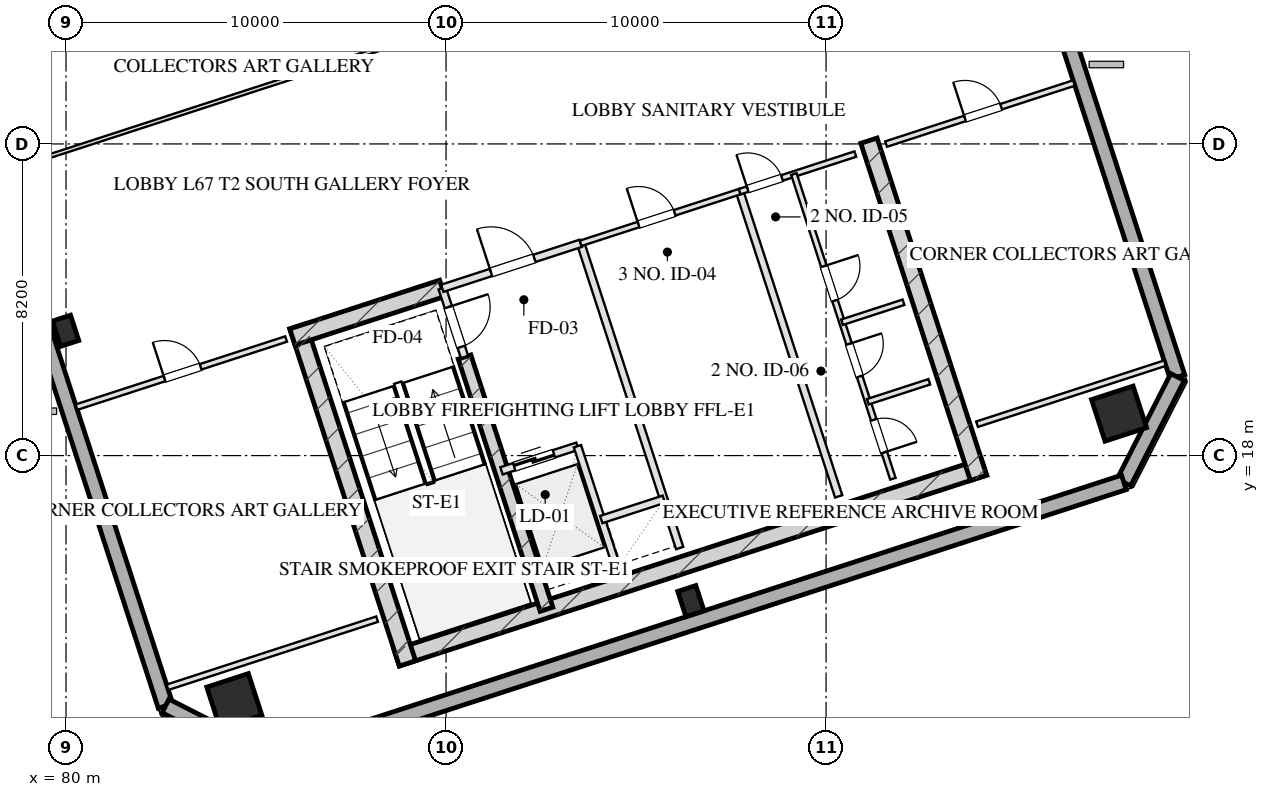
"""IFC4 building model, lengths in metres.
Left out: names, types, materials, properties, quantities, classifications, styles, units other than length and angle.
Written with IfcOpenShell. Run it as: python <this file> out.ifc"""

import sys

from ifc_helpers import new_model, si_unit, direction, frame, frame_2d, origin, origin_2d, place, context, subcontext, project, spatial, rectangle, hollow_rectangle, extrude, element, fill, save


model = new_model("IFC4")
c1 = context("Model", 3, precision=1e-05, world=origin(), true_north=direction((0.0, 1.0)))
c2 = subcontext(c1, "Body", "Model", "MODEL_VIEW")
j1 = project(units=[si_unit("LENGTHUNIT", "METRE"), si_unit("PLANEANGLEUNIT", "RADIAN")], contexts=[c1])
p1 = place(None, origin())
s1 = spatial("IfcSite", under=j1, at=p1, CompositionType="ELEMENT")
p2 = place(p1, origin())
s2 = spatial("IfcBuilding", under=s1, at=p2, CompositionType="ELEMENT")
p3 = place(p2, frame((0.0, 0.0, 247.2)))
s3 = spatial("IfcBuildingStorey", under=s2, at=p3, CompositionType="ELEMENT", Elevation=247.2)
p4 = place(p3, frame((88.701, 12.675, 0.0), z_axis=(0.0, 0.0, 1.0), x_axis=(0.95105824505, 0.309011673763, 0.0)))
e1 = element("IfcWall", 1, at=p4, inside=s3, PredefinedType="SHEAR", context=c2, shape_type="SweptSolid", body=[
    extrude(rectangle(XDim=16.25, YDim=0.45, at=frame_2d((8.125, 0.0))), origin(), (0.0, 0.0, 1.0), 3.2),
])
for number, where, z_axis, x_axis in (
    (2, (86.102, 21.404, 0.0), (0.0, 0.0, 1.0), (0.309, -0.951, 0.0)),
    (3, (101.128, 26.286, 0.0), (0.0, 0.0, 1.0), (0.309, -0.951, 0.0)),
):
    element("IfcWall", number, at=place(p3, frame(where, z_axis=z_axis, x_axis=x_axis)), inside=s3, PredefinedType="SHEAR", context=c2, shape_type="SweptSolid", body=[
        extrude(rectangle(XDim=9.33, YDim=0.45, at=frame_2d((4.665, 0.0))), origin(), (0.0, 0.0, 1.0), 3.2),
    ])
p5 = place(p3, frame((90.486, 20.594, 0.0), z_axis=(0.0, 0.0, 1.0), x_axis=(0.309020428229, -0.951055400562, 0.0)))
e4 = element("IfcWall", 4, at=p5, inside=s3, PredefinedType="SHEAR", context=c2, shape_type="SweptSolid", body=[
    extrude(rectangle(XDim=6.98, YDim=0.35, at=frame_2d((3.49, 0.0))), origin(), (0.0, 0.0, 1.0), 3.2),
])
p6 = place(p3, frame((85.957, 21.12, 0.0), z_axis=(0.0, 0.0, 1.0), x_axis=(0.951064796122, 0.308991510526, 0.0)))
e5 = element("IfcWall", 5, at=p6, inside=s3, PredefinedType="SHEAR", context=c2, shape_type="SweptSolid", body=[
    extrude(rectangle(XDim=4.145, YDim=0.45, at=frame_2d((2.073, 0.0))), origin(), (0.0, 0.0, 1.0), 3.2),
])
for number, where, z_axis, x_axis in (
    (6, (84.428, 11.539, 0.0), (0.0, 0.0, 1.0), (0.951, 0.309, 0.0)),
    (7, (107.71, 19.104, 0.0), (0.0, 0.0, 1.0), (0.951, 0.309, 0.0)),
):
    element("IfcColumn", number, at=place(p3, frame(where, z_axis=z_axis, x_axis=x_axis)), inside=s3, PredefinedType="COLUMN", context=c2, shape_type="SweptSolid", body=[
        extrude(hollow_rectangle(XDim=1.15, YDim=1.15, WallThickness=0.04, at=origin_2d()), origin(), (0.0, 0.0, 1.0), 3.201),
    ])
for number, where, z_axis, x_axis in (
    (8, (79.99, 21.284, 0.0), (0.0, 0.0, 1.0), (0.951, 0.309, 0.0)),
    (9, (96.443, 14.17, 0.0), (0.0, 0.0, 1.0), (0.951, 0.309, 0.0)),
):
    element("IfcColumn", number, at=place(p3, frame(where, z_axis=z_axis, x_axis=x_axis)), inside=s3, PredefinedType="COLUMN", context=c2, shape_type="SweptSolid", body=[
        extrude(hollow_rectangle(XDim=0.5, YDim=0.7, WallThickness=0.025, at=origin_2d()), origin(), (0.0, 0.0, 1.0), 3.201),
    ])
p7 = place(p3, frame((82.618, 11.414, 0.0), z_axis=(0.0, 0.0, 1.0), x_axis=(-0.309016491071, 0.951056679828, 0.0)))
e10 = element("IfcWall", 10, at=p7, inside=s3, PredefinedType="SOLIDWALL", context=c2, shape_type="SweptSolid", body=[
    extrude(rectangle(XDim=38.4, YDim=0.4, at=frame_2d((19.2, 0.0))), origin(), (0.0, 0.0, 1.0), 2.36),
])
p8 = place(p7, frame((11.825, 0.0, 0.75)))
e11 = element("IfcOpeningElement", 11, at=p8, cuts=e10, PredefinedType="OPENING", context=c2, shape_type="SweptSolid", body=[
    extrude(rectangle(XDim=1.95, YDim=1.21, at=frame_2d((0.975, 0.605))), frame((0.0, 0.21, 0.0), z_axis=(0.0, -1.0, 0.0), x_axis=(1.0, 0.0, 0.0)), (0.0, 0.0, 1.0), 0.42),
])
p9 = place(p7, frame((15.625, 0.0, 0.75)))
e12 = element("IfcOpeningElement", 12, at=p9, cuts=e10, PredefinedType="OPENING", context=c2, shape_type="SweptSolid", body=[
    extrude(rectangle(XDim=1.95, YDim=1.21, at=frame_2d((0.975, 0.605))), frame((0.0, 0.21, 0.0), z_axis=(0.0, -1.0, 0.0), x_axis=(1.0, 0.0, 0.0)), (0.0, 0.0, 1.0), 0.42),
])
p10 = place(p7, frame((21.5, 0.0, 0.0)))
e13 = element("IfcOpeningElement", 13, at=p10, cuts=e10, PredefinedType="OPENING", context=c2, shape_type="SweptSolid", body=[
    extrude(rectangle(XDim=1.1, YDim=2.15, at=frame_2d((0.55, 1.075))), frame((0.0, 0.21, 0.0), z_axis=(0.0, -1.0, 0.0), x_axis=(1.0, 0.0, 0.0)), (0.0, 0.0, 1.0), 0.42),
])
p11 = place(p3, frame((97.382, 56.586, 0.0), z_axis=(0.0, 0.0, 1.0), x_axis=(0.309016491071, -0.951056679828, 0.0)))
e14 = element("IfcWall", 14, at=p11, inside=s3, PredefinedType="SOLIDWALL", context=c2, shape_type="SweptSolid", body=[
    extrude(rectangle(XDim=38.4, YDim=0.4, at=frame_2d((19.2, 0.0))), origin(), (0.0, 0.0, 1.0), 2.36),
])
p12 = place(p11, frame((24.625, 0.0, 0.75)))
e15 = element("IfcOpeningElement", 15, at=p12, cuts=e14, PredefinedType="OPENING", context=c2, shape_type="SweptSolid", body=[
    extrude(rectangle(XDim=1.95, YDim=1.21, at=frame_2d((0.975, 0.605))), frame((0.0, 0.21, 0.0), z_axis=(0.0, -1.0, 0.0), x_axis=(1.0, 0.0, 0.0)), (0.0, 0.0, 1.0), 0.42),
])
p13 = place(p11, frame((20.825, 0.0, 0.75)))
e16 = element("IfcOpeningElement", 16, at=p13, cuts=e14, PredefinedType="OPENING", context=c2, shape_type="SweptSolid", body=[
    extrude(rectangle(XDim=1.95, YDim=1.21, at=frame_2d((0.975, 0.605))), frame((0.0, 0.21, 0.0), z_axis=(0.0, -1.0, 0.0), x_axis=(1.0, 0.0, 0.0)), (0.0, 0.0, 1.0), 0.42),
])
p14 = place(p11, frame((15.8, 0.0, 0.0)))
e17 = element("IfcOpeningElement", 17, at=p14, cuts=e14, PredefinedType="OPENING", context=c2, shape_type="SweptSolid", body=[
    extrude(rectangle(XDim=1.1, YDim=2.15, at=frame_2d((0.55, 1.075))), frame((0.0, 0.21, 0.0), z_axis=(0.0, -1.0, 0.0), x_axis=(1.0, 0.0, 0.0)), (0.0, 0.0, 1.0), 0.42),
])
p15 = place(p3, frame((109.248, 20.066, 0.0), z_axis=(0.0, 0.0, 1.0), x_axis=(-0.453949291228, -0.891027519774, 0.0)))
e18 = element("IfcWall", 18, at=p15, inside=s3, PredefinedType="SOLIDWALL", context=c2, shape_type="SweptSolid", body=[
    extrude(rectangle(XDim=3.111, YDim=0.4, at=frame_2d((1.556, 0.0))), origin(), (0.0, 0.0, 1.0), 2.36),
])
p16 = place(p3, frame((107.835, 17.294, 0.0), z_axis=(0.0, 0.0, 1.0), x_axis=(-0.951058012937, -0.309012388148, 0.0)))
e19 = element("IfcWall", 19, at=p16, inside=s3, PredefinedType="SOLIDWALL", context=c2, shape_type="SweptSolid", body=[
    extrude(rectangle(XDim=23.6, YDim=0.4, at=frame_2d((11.8, 0.0))), origin(), (0.0, 0.0, 1.0), 2.36),
])
p17 = place(p3, frame((85.39, 10.001, 0.0), z_axis=(0.0, 0.0, 1.0), x_axis=(-0.890979603174, 0.454043331334, 0.0)))
e20 = element("IfcWall", 20, at=p17, inside=s3, PredefinedType="SOLIDWALL", context=c2, shape_type="SweptSolid", body=[
    extrude(rectangle(XDim=3.111, YDim=0.4, at=frame_2d((1.556, 0.0))), origin(), (0.0, 0.0, 1.0), 2.36),
])
p18 = place(p3, frame((89.899, 22.401, 0.0), z_axis=(0.0, 0.0, 1.0), x_axis=(0.308932062672, -0.951084108086, 0.0)))
e21 = element("IfcWall", 21, at=p18, inside=s3, PredefinedType="PARTITIONING", context=c2, shape_type="SweptSolid", body=[
    extrude(rectangle(XDim=1.9, YDim=0.2, at=frame_2d((0.95, 0.0))), origin(), (0.0, 0.0, 1.0), 2.925),
])
p19 = place(p18, frame((0.52, 0.0, 0.0)))
e22 = element("IfcOpeningElement", 22, at=p19, cuts=e21, PredefinedType="OPENING", context=c2, shape_type="SweptSolid", body=[
    extrude(rectangle(XDim=1.1, YDim=2.05, at=frame_2d((0.55, 1.025))), frame((0.0, 0.11, 0.0), z_axis=(0.0, -1.0, 0.0), x_axis=(1.0, 0.0, 0.0)), (0.0, 0.0, 1.0), 0.22),
])
p20 = place(p3, frame((93.542, 23.585, 0.0), z_axis=(0.0, 0.0, 1.0), x_axis=(0.309042196757, -0.951048327176, 0.0)))
e23 = element("IfcWall", 23, at=p20, inside=s3, PredefinedType="PARTITIONING", context=c2, shape_type="SweptSolid", body=[
    extrude(rectangle(XDim=8.43, YDim=0.2, at=frame_2d((4.215, 0.0))), origin(), (0.0, 0.0, 1.0), 2.925),
])
p21 = place(p3, frame((89.899, 22.401, 0.0), z_axis=(0.0, 0.0, 1.0), x_axis=(0.951046716504, 0.309047153403, 0.0)))
e24 = element("IfcWall", 24, at=p21, inside=s3, PredefinedType="PARTITIONING", context=c2, shape_type="SweptSolid", body=[
    extrude(rectangle(XDim=3.83, YDim=0.2, at=frame_2d((1.915, 0.0))), origin(), (0.0, 0.0, 1.0), 2.925),
])
p22 = place(p21, frame((1.35, 0.0, 0.0)))
e25 = element("IfcOpeningElement", 25, at=p22, cuts=e24, PredefinedType="OPENING", context=c2, shape_type="SweptSolid", body=[
    extrude(rectangle(XDim=1.2, YDim=2.05, at=frame_2d((0.6, 1.025))), frame((0.0, 0.11, 0.0), z_axis=(0.0, -1.0, 0.0), x_axis=(1.0, 0.0, 0.0)), (0.0, 0.0, 1.0), 0.22),
])
p23 = place(p3, frame((91.46, 17.598, 0.0), z_axis=(0.0, 0.0, 1.0), x_axis=(0.951062257173, 0.308999325213, 0.0)))
e26 = element("IfcWall", 26, at=p23, inside=s3, PredefinedType="PARTITIONING", context=c2, shape_type="SweptSolid", body=[
    extrude(rectangle(XDim=2.1, YDim=0.2, at=frame_2d((1.05, 0.0))), origin(), (0.0, 0.0, 1.0), 2.925),
])
p24 = place(p23, frame((0.35, 0.0, 0.0)))
e27 = element("IfcOpeningElement", 27, at=p24, cuts=e26, PredefinedType="OPENING", context=c2, shape_type="SweptSolid", body=[
    extrude(rectangle(XDim=1.1, YDim=2.05, at=frame_2d((0.55, 1.025))), frame((0.0, 0.11, 0.0), z_axis=(0.0, -1.0, 0.0), x_axis=(1.0, 0.0, 0.0)), (0.0, 0.0, 1.0), 0.22),
])
p25 = place(p3, frame((93.457, 18.247, 0.0), z_axis=(0.0, 0.0, 1.0), x_axis=(0.3089935693, -0.951064127245, 0.0)))
e28 = element("IfcWall", 28, at=p25, inside=s3, PredefinedType="PARTITIONING", context=c2, shape_type="SweptSolid", body=[
    extrude(rectangle(XDim=3.7, YDim=0.2, at=frame_2d((1.85, 0.0))), origin(), (0.0, 0.0, 1.0), 2.925),
])
p26 = place(p3, frame((94.084, 16.317, 0.0), z_axis=(0.0, 0.0, 1.0), x_axis=(0.951041328149, 0.309063734775, 0.0)))
e29 = element("IfcWall", 29, at=p26, inside=s3, PredefinedType="PARTITIONING", context=c2, shape_type="SweptSolid", body=[
    extrude(rectangle(XDim=1.73, YDim=0.2, at=frame_2d((0.865, 0.0))), origin(), (0.0, 0.0, 1.0), 2.925),
])
p27 = place(p3, frame((97.727, 24.944, 0.0), z_axis=(0.0, 0.0, 1.0), x_axis=(0.309016001439, -0.951056838919, 0.0)))
e30 = element("IfcWall", 30, at=p27, inside=s3, PredefinedType="PARTITIONING", context=c2, shape_type="SweptSolid", body=[
    extrude(rectangle(XDim=8.43, YDim=0.2, at=frame_2d((4.215, 0.0))), origin(), (0.0, 0.0, 1.0), 2.925),
])
p28 = place(p3, frame((93.542, 23.585, 0.0), z_axis=(0.0, 0.0, 1.0), x_axis=(0.951063829732, 0.308994485023, 0.0)))
e31 = element("IfcWall", 31, at=p28, inside=s3, PredefinedType="PARTITIONING", context=c2, shape_type="SweptSolid", body=[
    extrude(rectangle(XDim=4.4, YDim=0.15, at=frame_2d((2.2, 0.0))), origin(), (0.0, 0.0, 1.0), 2.925),
])
p29 = place(p28, frame((1.6, 0.0, 0.0)))
e32 = element("IfcOpeningElement", 32, at=p29, cuts=e31, PredefinedType="OPENING", context=c2, shape_type="SweptSolid", body=[
    extrude(rectangle(XDim=1.0, YDim=2.05, at=frame_2d((0.5, 1.025))), frame((0.0, 0.085, 0.0), z_axis=(0.0, -1.0, 0.0), x_axis=(1.0, 0.0, 0.0)), (0.0, 0.0, 1.0), 0.17),
])
p30 = place(p3, frame((97.727, 24.944, 0.0), z_axis=(0.0, 0.0, 1.0), x_axis=(0.951036872128, 0.309077446369, 0.0)))
e33 = element("IfcWall", 33, at=p30, inside=s3, PredefinedType="PARTITIONING", context=c2, shape_type="SweptSolid", body=[
    extrude(rectangle(XDim=3.2, YDim=0.15, at=frame_2d((1.6, 0.0))), origin(), (0.0, 0.0, 1.0), 2.925),
])
p31 = place(p30, frame((0.22, 0.0, 0.0)))
e34 = element("IfcOpeningElement", 34, at=p31, cuts=e33, PredefinedType="OPENING", context=c2, shape_type="SweptSolid", body=[
    extrude(rectangle(XDim=0.95, YDim=2.05, at=frame_2d((0.475, 1.025))), frame((0.0, 0.085, 0.0), z_axis=(0.0, -1.0, 0.0), x_axis=(1.0, 0.0, 0.0)), (0.0, 0.0, 1.0), 0.17),
])
p32 = place(p3, frame((99.153, 25.408, 0.0), z_axis=(0.0, 0.0, 1.0), x_axis=(0.309016001439, -0.951056838919, 0.0)))
e35 = element("IfcWall", 35, at=p32, inside=s3, PredefinedType="PARTITIONING", context=c2, shape_type="SweptSolid", body=[
    extrude(rectangle(XDim=8.43, YDim=0.15, at=frame_2d((4.215, 0.0))), origin(), (0.0, 0.0, 1.0), 2.925),
])
p33 = place(p32, frame((2.55, 0.0, 0.0)))
e36 = element("IfcOpeningElement", 36, at=p33, cuts=e35, PredefinedType="OPENING", context=c2, shape_type="SweptSolid", body=[
    extrude(rectangle(XDim=0.95, YDim=2.05, at=frame_2d((0.475, 1.025))), frame((0.0, 0.085, 0.0), z_axis=(0.0, -1.0, 0.0), x_axis=(1.0, 0.0, 0.0)), (0.0, 0.0, 1.0), 0.17),
])
p34 = place(p32, frame((4.7, 0.0, 0.0)))
e37 = element("IfcOpeningElement", 37, at=p34, cuts=e35, PredefinedType="OPENING", context=c2, shape_type="SweptSolid", body=[
    extrude(rectangle(XDim=0.9, YDim=2.05, at=frame_2d((0.45, 1.025))), frame((0.0, 0.085, 0.0), z_axis=(0.0, -1.0, 0.0), x_axis=(1.0, 0.0, 0.0)), (0.0, 0.0, 1.0), 0.17),
])
p35 = place(p32, frame((6.8, 0.0, 0.0)))
e38 = element("IfcOpeningElement", 38, at=p35, cuts=e35, PredefinedType="OPENING", context=c2, shape_type="SweptSolid", body=[
    extrude(rectangle(XDim=0.9, YDim=2.05, at=frame_2d((0.45, 1.025))), frame((0.0, 0.085, 0.0), z_axis=(0.0, -1.0, 0.0), x_axis=(1.0, 0.0, 0.0)), (0.0, 0.0, 1.0), 0.17),
])
p36 = place(p3, frame((100.42, 21.509, 0.0), z_axis=(0.0, 0.0, 1.0), x_axis=(0.951040401051, 0.309066587596, 0.0)))
e39 = element("IfcWall", 39, at=p36, inside=s3, PredefinedType="PARTITIONING", context=c2, shape_type="SweptSolid", body=[
    extrude(rectangle(XDim=1.7, YDim=0.15, at=frame_2d((0.85, 0.0))), origin(), (0.0, 0.0, 1.0), 2.925),
])
p37 = place(p3, frame((101.1, 19.416, 0.0), z_axis=(0.0, 0.0, 1.0), x_axis=(0.951054116971, 0.309024378638, 0.0)))
e40 = element("IfcWall", 40, at=p37, inside=s3, PredefinedType="PARTITIONING", context=c2, shape_type="SweptSolid", body=[
    extrude(rectangle(XDim=1.7, YDim=0.15, at=frame_2d((0.85, 0.0))), origin(), (0.0, 0.0, 1.0), 2.925),
])
p38 = place(p3, frame((82.669, 11.903, 0.0), z_axis=(0.0, 0.0, 1.0), x_axis=(0.951059431056, 0.309008023519, 0.0)))
e41 = element("IfcWall", 41, at=p38, inside=s3, PredefinedType="PARTITIONING", context=c2, shape_type="SweptSolid", body=[
    extrude(rectangle(XDim=5.8, YDim=0.15, at=frame_2d((2.9, 0.0))), origin(), (0.0, 0.0, 1.0), 2.925),
])
p39 = place(p3, frame((80.275, 19.274, 0.0), z_axis=(0.0, 0.0, 1.0), x_axis=(0.951059431056, 0.309008023519, 0.0)))
e42 = element("IfcWall", 42, at=p39, inside=s3, PredefinedType="PARTITIONING", context=c2, shape_type="SweptSolid", body=[
    extrude(rectangle(XDim=5.8, YDim=0.15, at=frame_2d((2.9, 0.0))), origin(), (0.0, 0.0, 1.0), 2.925),
])
p40 = place(p39, frame((2.436, 0.0, 0.0)))
e43 = element("IfcOpeningElement", 43, at=p40, cuts=e42, PredefinedType="OPENING", context=c2, shape_type="SweptSolid", body=[
    extrude(rectangle(XDim=1.0, YDim=2.05, at=frame_2d((0.5, 1.025))), frame((0.0, 0.085, 0.0), z_axis=(0.0, -1.0, 0.0), x_axis=(1.0, 0.0, 0.0)), (0.0, 0.0, 1.0), 0.17),
])
p41 = place(p3, frame((103.973, 18.825, 0.0), z_axis=(0.0, 0.0, 1.0), x_axis=(0.951055112834, 0.309021313752, 0.0)))
e44 = element("IfcWall", 44, at=p41, inside=s3, PredefinedType="PARTITIONING", context=c2, shape_type="SweptSolid", body=[
    extrude(rectangle(XDim=5.2, YDim=0.15, at=frame_2d((2.6, 0.0))), origin(), (0.0, 0.0, 1.0), 2.925),
])
p42 = place(p3, frame((101.578, 26.196, 0.0), z_axis=(0.0, 0.0, 1.0), x_axis=(0.951064427824, 0.308992644131, 0.0)))
e45 = element("IfcWall", 45, at=p42, inside=s3, PredefinedType="PARTITIONING", context=c2, shape_type="SweptSolid", body=[
    extrude(rectangle(XDim=5.2, YDim=0.15, at=frame_2d((2.6, 0.0))), origin(), (0.0, 0.0, 1.0), 2.925),
])
p43 = place(p42, frame((2.184, 0.0, 0.0)))
e46 = element("IfcOpeningElement", 46, at=p43, cuts=e45, PredefinedType="OPENING", context=c2, shape_type="SweptSolid", body=[
    extrude(rectangle(XDim=1.0, YDim=2.05, at=frame_2d((0.5, 1.025))), frame((0.0, 0.085, 0.0), z_axis=(0.0, -1.0, 0.0), x_axis=(1.0, 0.0, 0.0)), (0.0, 0.0, 1.0), 0.17),
])
p44 = place(p3, frame((78.266, 25.456, 0.0), z_axis=(0.0, 0.0, 1.0), x_axis=(0.951056346912, 0.309017515681, 0.0)))
e47 = element("IfcWall", 47, at=p44, inside=s3, PredefinedType="MOVABLE", context=c2, shape_type="SweptSolid", body=[
    extrude(rectangle(XDim=14.575, YDim=0.1, at=frame_2d((7.288, 0.0))), origin(), (0.0, 0.0, 1.0), 2.925),
])
p45 = place(p19, origin())
e48 = element("IfcDoor", 48, at=p45, inside=s3, OperationType="SINGLE_SWING_LEFT", PredefinedType="DOOR", context=c2, shape_type="SweptSolid", body=[
    extrude(rectangle(XDim=1.1, YDim=2.05, at=frame_2d((0.55, 1.025))), frame((0.0, 0.025, 0.0), z_axis=(0.0, -1.0, 0.0), x_axis=(1.0, 0.0, 0.0)), (0.0, 0.0, 1.0), 0.05),
])
fill(e22, e48)
p46 = place(p22, origin())
e49 = element("IfcDoor", 49, at=p46, inside=s3, OperationType="SINGLE_SWING_LEFT", PredefinedType="DOOR", context=c2, shape_type="SweptSolid", body=[
    extrude(rectangle(XDim=1.2, YDim=2.05, at=frame_2d((0.6, 1.025))), frame((0.0, 0.025, 0.0), z_axis=(0.0, -1.0, 0.0), x_axis=(1.0, 0.0, 0.0)), (0.0, 0.0, 1.0), 0.05),
])
fill(e25, e49)
p47 = place(p24, origin())
e50 = element("IfcDoor", 50, at=p47, inside=s3, OperationType="DOUBLE_DOOR_SLIDING", PredefinedType="DOOR", context=c2, shape_type="SweptSolid", body=[
    extrude(rectangle(XDim=1.1, YDim=2.05, at=frame_2d((0.55, 1.025))), frame((0.0, 0.025, 0.0), z_axis=(0.0, -1.0, 0.0), x_axis=(1.0, 0.0, 0.0)), (0.0, 0.0, 1.0), 0.05),
])
fill(e27, e50)
p48 = place(p29, origin())
e51 = element("IfcDoor", 51, at=p48, inside=s3, OperationType="SINGLE_SWING_LEFT", PredefinedType="DOOR", context=c2, shape_type="SweptSolid", body=[
    extrude(rectangle(XDim=1.0, YDim=2.05, at=frame_2d((0.5, 1.025))), frame((0.0, 0.025, 0.0), z_axis=(0.0, -1.0, 0.0), x_axis=(1.0, 0.0, 0.0)), (0.0, 0.0, 1.0), 0.05),
])
fill(e32, e51)
p49 = place(p31, origin())
e52 = element("IfcDoor", 52, at=p49, inside=s3, OperationType="SINGLE_SWING_LEFT", PredefinedType="DOOR", context=c2, shape_type="SweptSolid", body=[
    extrude(rectangle(XDim=0.95, YDim=2.05, at=frame_2d((0.475, 1.025))), frame((0.0, 0.025, 0.0), z_axis=(0.0, -1.0, 0.0), x_axis=(1.0, 0.0, 0.0)), (0.0, 0.0, 1.0), 0.05),
])
fill(e34, e52)
p50 = place(p33, origin())
e53 = element("IfcDoor", 53, at=p50, inside=s3, OperationType="SINGLE_SWING_LEFT", PredefinedType="DOOR", context=c2, shape_type="SweptSolid", body=[
    extrude(rectangle(XDim=0.95, YDim=2.05, at=frame_2d((0.475, 1.025))), frame((0.0, 0.025, 0.0), z_axis=(0.0, -1.0, 0.0), x_axis=(1.0, 0.0, 0.0)), (0.0, 0.0, 1.0), 0.05),
])
fill(e36, e53)
p51 = place(p34, origin())
e54 = element("IfcDoor", 54, at=p51, inside=s3, OperationType="SINGLE_SWING_LEFT", PredefinedType="DOOR", context=c2, shape_type="SweptSolid", body=[
    extrude(rectangle(XDim=0.9, YDim=2.05, at=frame_2d((0.45, 1.025))), frame((0.0, 0.025, 0.0), z_axis=(0.0, -1.0, 0.0), x_axis=(1.0, 0.0, 0.0)), (0.0, 0.0, 1.0), 0.05),
])
fill(e37, e54)
p52 = place(p35, origin())
e55 = element("IfcDoor", 55, at=p52, inside=s3, OperationType="SINGLE_SWING_RIGHT", PredefinedType="DOOR", context=c2, shape_type="SweptSolid", body=[
    extrude(rectangle(XDim=0.9, YDim=2.05, at=frame_2d((0.45, 1.025))), frame((0.0, 0.025, 0.0), z_axis=(0.0, -1.0, 0.0), x_axis=(1.0, 0.0, 0.0)), (0.0, 0.0, 1.0), 0.05),
])
fill(e38, e55)
p53 = place(p40, origin())
e56 = element("IfcDoor", 56, at=p53, inside=s3, OperationType="SINGLE_SWING_LEFT", PredefinedType="DOOR", context=c2, shape_type="SweptSolid", body=[
    extrude(rectangle(XDim=1.0, YDim=2.05, at=frame_2d((0.5, 1.025))), frame((0.0, 0.025, 0.0), z_axis=(0.0, -1.0, 0.0), x_axis=(1.0, 0.0, 0.0)), (0.0, 0.0, 1.0), 0.05),
])
fill(e43, e56)
p54 = place(p43, origin())
e57 = element("IfcDoor", 57, at=p54, inside=s3, OperationType="SINGLE_SWING_LEFT", PredefinedType="DOOR", context=c2, shape_type="SweptSolid", body=[
    extrude(rectangle(XDim=1.0, YDim=2.05, at=frame_2d((0.5, 1.025))), frame((0.0, 0.025, 0.0), z_axis=(0.0, -1.0, 0.0), x_axis=(1.0, 0.0, 0.0)), (0.0, 0.0, 1.0), 0.05),
])
fill(e46, e57)
save(model, sys.argv[1])
